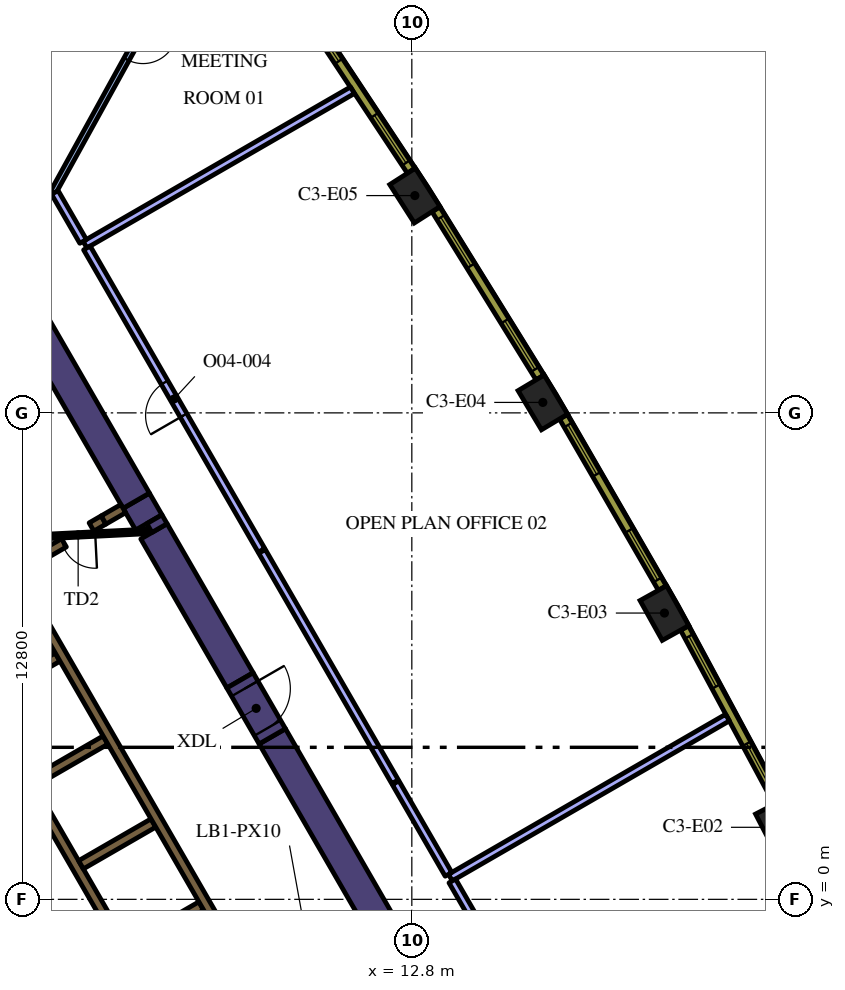
"""IFC4 building model, lengths in metres.
Left out: names, types, materials, properties, quantities, classifications, styles, units other than length and angle.
Written with IfcOpenShell. Run it as: python <this file> out.ifc"""

import sys

from ifc_helpers import new_model, si_unit, direction, frame, frame_2d, origin, origin_2d, place, context, subcontext, project, spatial, polyline, rectangle, outline, extrude, element, fill, save


model = new_model("IFC4")
c1 = context("Model", 3, precision=1e-05, world=origin(), true_north=direction((0.0, 1.0)))
c2 = subcontext(c1, "Body", "Model", "MODEL_VIEW")
j1 = project(units=[si_unit("LENGTHUNIT", "METRE"), si_unit("PLANEANGLEUNIT", "RADIAN")], contexts=[c1])
p1 = place(None, origin())
s1 = spatial("IfcSite", under=j1, at=p1, CompositionType="ELEMENT")
p2 = place(p1, origin())
s2 = spatial("IfcBuilding", under=s1, at=p2, CompositionType="ELEMENT")
p3 = place(p2, frame((0.0, 0.0, 183.6)))
s3 = spatial("IfcBuildingStorey", under=s2, at=p3, CompositionType="ELEMENT", Elevation=183.6)
for number, where, z_axis, x_axis in (
    (1, (22.476, 1.896, 0.0), (0.0, 0.0, 1.0), (-0.46, 0.888, 0.0)),
    (2, (19.447, 7.533, 0.0), (0.0, 0.0, 1.0), (-0.487, 0.874, 0.0)),
    (3, (16.247, 13.075, 0.0), (0.0, 0.0, 1.0), (-0.513, 0.858, 0.0)),
    (4, (12.88, 18.517, 0.0), (0.0, 0.0, 1.0), (-0.539, 0.842, 0.0)),
):
    element("IfcColumn", number, at=place(p3, frame(where, z_axis=z_axis, x_axis=x_axis)), inside=s3, PredefinedType="COLUMN", context=c2, shape_type="SweptSolid", body=[
        extrude(rectangle(XDim=1.2, YDim=0.8, at=origin_2d()), origin(), (0.0, 0.0, 1.0), 4.2),
    ])
p4 = place(p3, frame((9.129, 4.289, 0.0), z_axis=(0.0, 0.0, 1.0), x_axis=(0.499995742806, -0.866027861663, 0.0)))
e5 = element("IfcWall", 5, at=p4, inside=s3, PredefinedType="SOLIDWALL", context=c2, shape_type="SweptSolid", body=[
    extrude(rectangle(XDim=12.527, YDim=0.8, at=frame_2d((6.264, 0.0))), origin(), (0.0, 0.0, 1.0), 4.2),
])
p5 = place(p3, frame((5.878, 9.918, 0.0), z_axis=(0.0, 0.0, 1.0), x_axis=(-0.499893918903, 0.866086641072, 0.0)))
e6 = element("IfcWall", 6, at=p5, inside=s3, PredefinedType="SOLIDWALL", context=c2, shape_type="SweptSolid", body=[
    extrude(rectangle(XDim=0.657, YDim=0.8, at=frame_2d((0.329, 0.0))), origin(), (0.0, 0.0, 1.0), 4.2),
])
p6 = place(p3, frame((8.279, 5.761, 0.0), z_axis=(0.0, 0.0, 1.0), x_axis=(-0.500024261398, 0.866011396007, 0.0)))
e7 = element("IfcWall", 7, at=p6, inside=s3, PredefinedType="SOLIDWALL", context=c2, shape_type="SweptSolid", body=[
    extrude(rectangle(XDim=4.528, YDim=0.8, at=frame_2d((2.264, 0.0))), origin(), (0.0, 0.0, 1.0), 4.2),
])
p7 = place(p3, origin())
e8 = element("IfcWall", 8, at=p7, inside=s3, PredefinedType="SOLIDWALL", context=c2, shape_type="SweptSolid", body=[
    extrude(outline(polyline([(5.961, 9.654), (5.827, 9.886), (6.226, 10.116), (6.36, 9.884), (5.961, 9.654)])), origin(), (0.0, 0.0, 1.0), 4.2),
])
p8 = place(p3, frame((5.549, 10.489, 0.0), z_axis=(0.0, 0.0, 1.0), x_axis=(-0.50001746176, 0.866015321998, 0.0)))
e9 = element("IfcWall", 9, at=p8, inside=s3, PredefinedType="SOLIDWALL", context=c2, shape_type="SweptSolid", body=[
    extrude(rectangle(XDim=7.068, YDim=0.8, at=frame_2d((3.534, 0.0))), origin(), (0.0, 0.0, 1.0), 4.2),
])
p9 = place(p3, frame((6.568, -3.627, 0.0), z_axis=(0.0, 0.0, 1.0), x_axis=(-0.499999455981, 0.866025717874, 0.0)))
e10 = element("IfcWall", 10, at=p9, inside=s3, PredefinedType="SOLIDWALL", context=c2, shape_type="SweptSolid", body=[
    extrude(rectangle(XDim=11.978, YDim=0.25, at=frame_2d((5.989, 0.0))), origin(), (0.0, 0.0, 1.0), 4.2),
])
p10 = place(p3, frame((3.647, 9.38, 0.0), z_axis=(0.0, 0.0, 1.0), x_axis=(-0.866025015791, -0.500000672024, 0.0)))
e11 = element("IfcWall", 11, at=p10, inside=s3, PredefinedType="SOLIDWALL", context=c2, shape_type="SweptSolid", body=[
    extrude(rectangle(XDim=3.849, YDim=0.25, at=frame_2d((1.924, 0.0))), origin(), (0.0, 0.0, 1.0), 4.2),
])
p11 = place(p3, frame((1.574, 5.274, 0.0), z_axis=(0.0, 0.0, 1.0), x_axis=(0.866028486751, 0.499994660107, 0.0)))
e12 = element("IfcWall", 12, at=p11, inside=s3, PredefinedType="SOLIDWALL", context=c2, shape_type="SweptSolid", body=[
    extrude(rectangle(XDim=2.2, YDim=0.25, at=frame_2d((1.1, 0.0))), origin(), (0.0, 0.0, 1.0), 4.2),
])
for number, where, z_axis, x_axis in (
    (13, (2.834, 3.091, 0.0), (0.0, 0.0, 1.0), (0.866, 0.5, 0.0)),
    (14, (4.094, 0.909, 0.0), (0.0, 0.0, 1.0), (0.866, 0.5, 0.0)),
    (15, (5.354, -1.274, 0.0), (0.0, 0.0, 1.0), (0.866, 0.5, 0.0)),
):
    element("IfcWall", number, at=place(p3, frame(where, z_axis=z_axis, x_axis=x_axis)), inside=s3, PredefinedType="SOLIDWALL", context=c2, shape_type="SweptSolid", body=[
        extrude(rectangle(XDim=2.2, YDim=0.25, at=frame_2d((1.1, 0.0))), origin(), (0.0, 0.0, 1.0), 4.2),
    ])
p12 = place(p3, frame((4.688, 9.981, 0.0), z_axis=(0.0, 0.0, 1.0), x_axis=(-0.865974312977, -0.500088481434, 0.0)))
e16 = element("IfcWall", 16, at=p12, inside=s3, PredefinedType="SOLIDWALL", context=c2, shape_type="SweptSolid", body=[
    extrude(rectangle(XDim=0.366, YDim=0.25, at=frame_2d((0.183, 0.0))), origin(), (0.0, 0.0, 1.0), 4.2),
])
p13 = place(p3, frame((4.689, 9.982, 0.0), z_axis=(0.0, 0.0, 1.0), x_axis=(0.865947592822, 0.500134748329, 0.0)))
e17 = element("IfcWall", 17, at=p13, inside=s3, PredefinedType="SOLIDWALL", context=c2, shape_type="SweptSolid", body=[
    extrude(rectangle(XDim=0.598, YDim=0.25, at=frame_2d((0.299, 0.0))), origin(), (0.0, 0.0, 1.0), 4.2),
])
p14 = place(p3, frame((8.565, -2.185, 0.0), z_axis=(0.0, 0.0, 1.0), x_axis=(-0.499997954832, 0.866026584559, 0.0)))
e18 = element("IfcWall", 18, at=p14, inside=s3, PredefinedType="SOLIDWALL", context=c2, shape_type="SweptSolid", body=[
    extrude(rectangle(XDim=12.35, YDim=0.25, at=frame_2d((6.175, 0.0))), origin(), (0.0, 0.0, 1.0), 4.2),
])
p15 = place(p14, frame((0.585, 0.0, 0.0)))
e19 = element("IfcOpeningElement", 19, at=p15, cuts=e18, PredefinedType="OPENING", context=c2, shape_type="SweptSolid", body=[
    extrude(rectangle(XDim=1.1, YDim=2.1, at=frame_2d((0.55, 1.05))), frame((0.0, 0.135, 0.0), z_axis=(0.0, -1.0, 0.0), x_axis=(1.0, 0.0, 0.0)), (0.0, 0.0, 1.0), 0.27),
])
p16 = place(p3, frame((5.917, 9.684, 0.0), z_axis=(0.0, 0.0, 1.0), x_axis=(-0.998758194515, -0.049820366212, 0.0)))
e20 = element("IfcWall", 20, at=p16, inside=s3, PredefinedType="PARTITIONING", context=c2, shape_type="SweptSolid", body=[
    extrude(rectangle(XDim=2.7, YDim=0.12, at=frame_2d((1.35, 0.0))), origin(), (0.0, 0.0, 1.0), 3.15),
])
p17 = place(p16, frame((1.45, 0.0, 0.0)))
e21 = element("IfcOpeningElement", 21, at=p17, cuts=e20, PredefinedType="OPENING", context=c2, shape_type="SweptSolid", body=[
    extrude(rectangle(XDim=0.9, YDim=2.1, at=frame_2d((0.45, 1.05))), frame((0.0, 0.07, 0.0), z_axis=(0.0, -1.0, 0.0), x_axis=(1.0, 0.0, 0.0)), (0.0, 0.0, 1.0), 0.14),
])
p18 = place(p3, frame((8.279, 5.761, 0.0), z_axis=(0.0, 0.0, 1.0), x_axis=(0.500062241894, -0.865989465428, 0.0)))
e22 = element("IfcWall", 22, at=p18, inside=s3, PredefinedType="SOLIDWALL", context=c2, shape_type="SweptSolid", body=[
    extrude(rectangle(XDim=1.7, YDim=0.8, at=frame_2d((0.85, 0.0))), origin(), (0.0, 0.0, 1.0), 4.2),
])
p19 = place(p18, frame((0.25, 0.0, 0.0)))
e23 = element("IfcOpeningElement", 23, at=p19, cuts=e22, PredefinedType="OPENING", context=c2, shape_type="SweptSolid", body=[
    extrude(rectangle(XDim=1.2, YDim=2.1, at=frame_2d((0.6, 1.05))), frame((0.0, 0.41, 0.0), z_axis=(0.0, -1.0, 0.0), x_axis=(1.0, 0.0, 0.0)), (0.0, 0.0, 1.0), 0.82),
])
p20 = place(p3, frame((13.815, 0.572, 0.0), z_axis=(0.0, 0.0, 1.0), x_axis=(0.866036391575, 0.499980968105, 0.0)))
e24 = element("IfcWall", 24, at=p20, inside=s3, PredefinedType="PARTITIONING", context=c2, shape_type="SweptSolid", body=[
    extrude(rectangle(XDim=8.42, YDim=0.2, at=frame_2d((4.21, 0.0))), origin(), (0.0, 0.0, 1.0), 3.15),
])
p21 = place(p3, frame((17.796, -6.324, 0.0), z_axis=(0.0, 0.0, 1.0), x_axis=(-0.500026166427, 0.866010296064, 0.0)))
e25 = element("IfcWall", 25, at=p21, inside=s3, PredefinedType="PARTITIONING", context=c2, shape_type="SweptSolid", body=[
    extrude(rectangle(XDim=7.863, YDim=0.2, at=frame_2d((3.931, 0.0))), origin(), (0.0, 0.0, 1.0), 3.15),
])
p22 = place(p21, frame((3.4, 0.0, 0.0)))
e26 = element("IfcOpeningElement", 26, at=p22, cuts=e25, PredefinedType="OPENING", context=c2, shape_type="SweptSolid", body=[
    extrude(rectangle(XDim=1.0, YDim=2.1, at=frame_2d((0.5, 1.05))), frame((0.0, 0.11, 0.0), z_axis=(0.0, -1.0, 0.0), x_axis=(1.0, 0.0, 0.0)), (0.0, 0.0, 1.0), 0.22),
])
p23 = place(p3, frame((4.2, 17.226, 0.0), z_axis=(0.0, 0.0, 1.0), x_axis=(0.866021486214, 0.500006785369, 0.0)))
e27 = element("IfcWall", 27, at=p23, inside=s3, PredefinedType="PARTITIONING", context=c2, shape_type="SweptSolid", body=[
    extrude(rectangle(XDim=8.126, YDim=0.2, at=frame_2d((4.063, 0.0))), origin(), (0.0, 0.0, 1.0), 3.15),
])
p24 = place(p3, frame((12.359, 3.094, 0.0), z_axis=(0.0, 0.0, 1.0), x_axis=(-0.500010275428, 0.866019471182, 0.0)))
e28 = element("IfcWall", 28, at=p24, inside=s3, PredefinedType="PARTITIONING", context=c2, shape_type="SweptSolid", body=[
    extrude(rectangle(XDim=7.0, YDim=0.2, at=frame_2d((3.5, 0.0))), origin(), (0.0, 0.0, 1.0), 3.15),
])
p25 = place(p3, frame((8.844, 9.182, 0.0), z_axis=(0.0, 0.0, 1.0), x_axis=(-0.50000000053, 0.866025403479, 0.0)))
e29 = element("IfcWall", 29, at=p25, inside=s3, PredefinedType="PARTITIONING", context=c2, shape_type="SweptSolid", body=[
    extrude(rectangle(XDim=9.188, YDim=0.2, at=frame_2d((4.594, 0.0))), origin(), (0.0, 0.0, 1.0), 3.15),
])
p26 = place(p25, frame((4.1, 0.0, 0.0)))
e30 = element("IfcOpeningElement", 30, at=p26, cuts=e29, PredefinedType="OPENING", context=c2, shape_type="SweptSolid", body=[
    extrude(rectangle(XDim=1.0, YDim=2.1, at=frame_2d((0.5, 1.05))), frame((0.0, 0.11, 0.0), z_axis=(0.0, -1.0, 0.0), x_axis=(1.0, 0.0, 0.0)), (0.0, 0.0, 1.0), 0.22),
])
p27 = place(p3, frame((13.765, 0.659, 0.0), z_axis=(0.0, 0.0, 1.0), x_axis=(-0.500046568876, 0.865998515562, 0.0)))
e31 = element("IfcWall", 31, at=p27, inside=s3, PredefinedType="PARTITIONING", context=c2, shape_type="SweptSolid", body=[
    extrude(rectangle(XDim=2.782, YDim=0.2, at=frame_2d((1.391, 0.0))), origin(), (0.0, 0.0, 1.0), 3.15),
])
p28 = place(p3, frame((7.698, 26.465, 0.0), z_axis=(0.0, 0.0, 1.0), x_axis=(-0.482998301798, -0.875621288263, 0.0)))
e32 = element("IfcWall", 32, at=p28, inside=s3, PredefinedType="PARTITIONING", context=c2, shape_type="SweptSolid", body=[
    extrude(rectangle(XDim=8.982, YDim=0.15, at=frame_2d((4.491, 0.0))), origin(), (0.0, 0.0, 1.0), 3.15),
])
p29 = place(p28, frame((4.083, 0.0, 0.0)))
e33 = element("IfcOpeningElement", 33, at=p29, cuts=e32, PredefinedType="OPENING", context=c2, shape_type="SweptSolid", body=[
    extrude(rectangle(XDim=0.9, YDim=2.1, at=frame_2d((0.45, 1.05))), frame((0.0, 0.085, 0.0), z_axis=(0.0, -1.0, 0.0), x_axis=(1.0, 0.0, 0.0)), (0.0, 0.0, 1.0), 0.17),
])
p30 = place(p3, frame((4.15, 17.312, 0.0), z_axis=(0.0, 0.0, 1.0), x_axis=(-0.499935638681, 0.86606255962, 0.0)))
e34 = element("IfcWall", 34, at=p30, inside=s3, PredefinedType="PARTITIONING", context=c2, shape_type="SweptSolid", body=[
    extrude(rectangle(XDim=1.487, YDim=0.2, at=frame_2d((0.744, 0.0))), origin(), (0.0, 0.0, 1.0), 3.15),
])
p31 = place(p3, frame((22.44, 2.555, 0.0), z_axis=(0.0, 0.0, 1.0), x_axis=(-0.473349833294, 0.880874528704, 0.0)))
e35 = element("IfcWall", 35, at=p31, inside=s3, PredefinedType="SOLIDWALL", context=c2, shape_type="SweptSolid", body=[
    extrude(rectangle(XDim=5.204, YDim=0.24, at=frame_2d((2.602, 0.0))), origin(), (0.0, 0.0, 1.0), 3.95),
])
p32 = place(p31, frame((0.248, 0.0, 0.9)))
e36 = element("IfcOpeningElement", 36, at=p32, cuts=e35, PredefinedType="OPENING", context=c2, shape_type="SweptSolid", body=[
    extrude(rectangle(XDim=1.5, YDim=2.55, at=frame_2d((0.75, 1.275))), frame((0.0, 0.13, 0.0), z_axis=(0.0, -1.0, 0.0), x_axis=(1.0, 0.0, 0.0)), (0.0, 0.0, 1.0), 0.26),
])
p33 = place(p31, frame((3.455, 0.0, 0.9)))
e37 = element("IfcOpeningElement", 37, at=p33, cuts=e35, PredefinedType="OPENING", context=c2, shape_type="SweptSolid", body=[
    extrude(rectangle(XDim=1.5, YDim=2.55, at=frame_2d((0.75, 1.275))), frame((0.0, 0.13, 0.0), z_axis=(0.0, -1.0, 0.0), x_axis=(1.0, 0.0, 0.0)), (0.0, 0.0, 1.0), 0.26),
])
p34 = place(p3, frame((19.391, 8.191, 0.0), z_axis=(0.0, 0.0, 1.0), x_axis=(-0.500009456303, 0.866019944116, 0.0)))
e38 = element("IfcWall", 38, at=p34, inside=s3, PredefinedType="SOLIDWALL", context=c2, shape_type="SweptSolid", body=[
    extrude(rectangle(XDim=5.204, YDim=0.24, at=frame_2d((2.602, 0.0))), origin(), (0.0, 0.0, 1.0), 3.95),
])
p35 = place(p34, frame((0.248, 0.0, 0.9)))
e39 = element("IfcOpeningElement", 39, at=p35, cuts=e38, PredefinedType="OPENING", context=c2, shape_type="SweptSolid", body=[
    extrude(rectangle(XDim=1.5, YDim=2.55, at=frame_2d((0.75, 1.275))), frame((0.0, 0.13, 0.0), z_axis=(0.0, -1.0, 0.0), x_axis=(1.0, 0.0, 0.0)), (0.0, 0.0, 1.0), 0.26),
])
p36 = place(p34, frame((3.455, 0.0, 0.9)))
e40 = element("IfcOpeningElement", 40, at=p36, cuts=e38, PredefinedType="OPENING", context=c2, shape_type="SweptSolid", body=[
    extrude(rectangle(XDim=1.5, YDim=2.55, at=frame_2d((0.75, 1.275))), frame((0.0, 0.13, 0.0), z_axis=(0.0, -1.0, 0.0), x_axis=(1.0, 0.0, 0.0)), (0.0, 0.0, 1.0), 0.26),
])
p37 = place(p3, frame((16.171, 13.731, 0.0), z_axis=(0.0, 0.0, 1.0), x_axis=(-0.526197926587, 0.850362124072, 0.0)))
e41 = element("IfcWall", 41, at=p37, inside=s3, PredefinedType="SOLIDWALL", context=c2, shape_type="SweptSolid", body=[
    extrude(rectangle(XDim=5.203, YDim=0.24, at=frame_2d((2.602, 0.0))), origin(), (0.0, 0.0, 1.0), 3.95),
])
p38 = place(p37, frame((0.248, 0.0, 0.9)))
e42 = element("IfcOpeningElement", 42, at=p38, cuts=e41, PredefinedType="OPENING", context=c2, shape_type="SweptSolid", body=[
    extrude(rectangle(XDim=1.5, YDim=2.55, at=frame_2d((0.75, 1.275))), frame((0.0, 0.13, 0.0), z_axis=(0.0, -1.0, 0.0), x_axis=(1.0, 0.0, 0.0)), (0.0, 0.0, 1.0), 0.26),
])
p39 = place(p37, frame((3.455, 0.0, 0.9)))
e43 = element("IfcOpeningElement", 43, at=p39, cuts=e41, PredefinedType="OPENING", context=c2, shape_type="SweptSolid", body=[
    extrude(rectangle(XDim=1.5, YDim=2.55, at=frame_2d((0.75, 1.275))), frame((0.0, 0.13, 0.0), z_axis=(0.0, -1.0, 0.0), x_axis=(1.0, 0.0, 0.0)), (0.0, 0.0, 1.0), 0.26),
])
p40 = place(p3, frame((12.783, 19.171, 0.0), z_axis=(0.0, 0.0, 1.0), x_axis=(-0.551892811511, 0.833915058386, 0.0)))
e44 = element("IfcWall", 44, at=p40, inside=s3, PredefinedType="SOLIDWALL", context=c2, shape_type="SweptSolid", body=[
    extrude(rectangle(XDim=5.204, YDim=0.24, at=frame_2d((2.602, 0.0))), origin(), (0.0, 0.0, 1.0), 3.95),
])
p41 = place(p40, frame((0.248, 0.0, 0.9)))
e45 = element("IfcOpeningElement", 45, at=p41, cuts=e44, PredefinedType="OPENING", context=c2, shape_type="SweptSolid", body=[
    extrude(rectangle(XDim=1.5, YDim=2.55, at=frame_2d((0.75, 1.275))), frame((0.0, 0.13, 0.0), z_axis=(0.0, -1.0, 0.0), x_axis=(1.0, 0.0, 0.0)), (0.0, 0.0, 1.0), 0.26),
])
p42 = place(p40, frame((3.455, 0.0, 0.9)))
e46 = element("IfcOpeningElement", 46, at=p42, cuts=e44, PredefinedType="OPENING", context=c2, shape_type="SweptSolid", body=[
    extrude(rectangle(XDim=1.5, YDim=2.55, at=frame_2d((0.75, 1.275))), frame((0.0, 0.13, 0.0), z_axis=(0.0, -1.0, 0.0), x_axis=(1.0, 0.0, 0.0)), (0.0, 0.0, 1.0), 0.26),
])
p43 = place(p17, origin())
e47 = element("IfcDoor", 47, at=p43, inside=s3, OperationType="SINGLE_SWING_LEFT", PredefinedType="DOOR", context=c2, shape_type="SweptSolid", body=[
    extrude(rectangle(XDim=0.9, YDim=2.1, at=frame_2d((0.45, 1.05))), frame((0.0, 0.025, 0.0), z_axis=(0.0, -1.0, 0.0), x_axis=(1.0, 0.0, 0.0)), (0.0, 0.0, 1.0), 0.05),
])
fill(e21, e47)
p44 = place(p19, origin())
e48 = element("IfcDoor", 48, at=p44, inside=s3, OperationType="SINGLE_SWING_LEFT", PredefinedType="DOOR", context=c2, shape_type="SweptSolid", body=[
    extrude(rectangle(XDim=1.2, YDim=2.1, at=frame_2d((0.6, 1.05))), frame((0.0, 0.025, 0.0), z_axis=(0.0, -1.0, 0.0), x_axis=(1.0, 0.0, 0.0)), (0.0, 0.0, 1.0), 0.05),
])
fill(e23, e48)
p45 = place(p26, origin())
e49 = element("IfcDoor", 49, at=p45, inside=s3, OperationType="SINGLE_SWING_RIGHT", PredefinedType="DOOR", context=c2, shape_type="SweptSolid", body=[
    extrude(rectangle(XDim=1.0, YDim=2.1, at=frame_2d((0.5, 1.05))), frame((0.0, 0.025, 0.0), z_axis=(0.0, -1.0, 0.0), x_axis=(1.0, 0.0, 0.0)), (0.0, 0.0, 1.0), 0.05),
])
fill(e30, e49)
p46 = place(p29, origin())
e50 = element("IfcDoor", 50, at=p46, inside=s3, OperationType="SINGLE_SWING_RIGHT", PredefinedType="DOOR", context=c2, shape_type="SweptSolid", body=[
    extrude(rectangle(XDim=0.9, YDim=2.1, at=frame_2d((0.45, 1.05))), frame((0.0, 0.025, 0.0), z_axis=(0.0, -1.0, 0.0), x_axis=(1.0, 0.0, 0.0)), (0.0, 0.0, 1.0), 0.05),
])
fill(e33, e50)
p47 = place(p32, origin())
e51 = element("IfcWindow", 51, at=p47, inside=s3, PartitioningType="SINGLE_PANEL", PredefinedType="WINDOW", context=c2, shape_type="SweptSolid", body=[
    extrude(rectangle(XDim=1.5, YDim=2.55, at=frame_2d((0.75, 1.275))), frame((0.0, 0.04, 0.0), z_axis=(0.0, -1.0, 0.0), x_axis=(1.0, 0.0, 0.0)), (0.0, 0.0, 1.0), 0.06),
])
fill(e36, e51)
p48 = place(p33, origin())
e52 = element("IfcWindow", 52, at=p48, inside=s3, PartitioningType="SINGLE_PANEL", PredefinedType="WINDOW", context=c2, shape_type="SweptSolid", body=[
    extrude(rectangle(XDim=1.5, YDim=2.55, at=frame_2d((0.75, 1.275))), frame((0.0, 0.04, 0.0), z_axis=(0.0, -1.0, 0.0), x_axis=(1.0, 0.0, 0.0)), (0.0, 0.0, 1.0), 0.06),
])
fill(e37, e52)
p49 = place(p35, origin())
e53 = element("IfcWindow", 53, at=p49, inside=s3, PartitioningType="SINGLE_PANEL", PredefinedType="WINDOW", context=c2, shape_type="SweptSolid", body=[
    extrude(rectangle(XDim=1.5, YDim=2.55, at=frame_2d((0.75, 1.275))), frame((0.0, 0.04, 0.0), z_axis=(0.0, -1.0, 0.0), x_axis=(1.0, 0.0, 0.0)), (0.0, 0.0, 1.0), 0.06),
])
fill(e39, e53)
p50 = place(p36, origin())
e54 = element("IfcWindow", 54, at=p50, inside=s3, PartitioningType="SINGLE_PANEL", PredefinedType="WINDOW", context=c2, shape_type="SweptSolid", body=[
    extrude(rectangle(XDim=1.5, YDim=2.55, at=frame_2d((0.75, 1.275))), frame((0.0, 0.04, 0.0), z_axis=(0.0, -1.0, 0.0), x_axis=(1.0, 0.0, 0.0)), (0.0, 0.0, 1.0), 0.06),
])
fill(e40, e54)
p51 = place(p38, origin())
e55 = element("IfcWindow", 55, at=p51, inside=s3, PartitioningType="SINGLE_PANEL", PredefinedType="WINDOW", context=c2, shape_type="SweptSolid", body=[
    extrude(rectangle(XDim=1.5, YDim=2.55, at=frame_2d((0.75, 1.275))), frame((0.0, 0.04, 0.0), z_axis=(0.0, -1.0, 0.0), x_axis=(1.0, 0.0, 0.0)), (0.0, 0.0, 1.0), 0.06),
])
fill(e42, e55)
p52 = place(p39, origin())
e56 = element("IfcWindow", 56, at=p52, inside=s3, PartitioningType="SINGLE_PANEL", PredefinedType="WINDOW", context=c2, shape_type="SweptSolid", body=[
    extrude(rectangle(XDim=1.5, YDim=2.55, at=frame_2d((0.75, 1.275))), frame((0.0, 0.04, 0.0), z_axis=(0.0, -1.0, 0.0), x_axis=(1.0, 0.0, 0.0)), (0.0, 0.0, 1.0), 0.06),
])
fill(e43, e56)
p53 = place(p41, origin())
e57 = element("IfcWindow", 57, at=p53, inside=s3, PartitioningType="SINGLE_PANEL", PredefinedType="WINDOW", context=c2, shape_type="SweptSolid", body=[
    extrude(rectangle(XDim=1.5, YDim=2.55, at=frame_2d((0.75, 1.275))), frame((0.0, 0.04, 0.0), z_axis=(0.0, -1.0, 0.0), x_axis=(1.0, 0.0, 0.0)), (0.0, 0.0, 1.0), 0.06),
])
fill(e45, e57)
p54 = place(p42, origin())
e58 = element("IfcWindow", 58, at=p54, inside=s3, PartitioningType="SINGLE_PANEL", PredefinedType="WINDOW", context=c2, shape_type="SweptSolid", body=[
    extrude(rectangle(XDim=1.5, YDim=2.55, at=frame_2d((0.75, 1.275))), frame((0.0, 0.04, 0.0), z_axis=(0.0, -1.0, 0.0), x_axis=(1.0, 0.0, 0.0)), (0.0, 0.0, 1.0), 0.06),
])
fill(e46, e58)
save(model, sys.argv[1])
